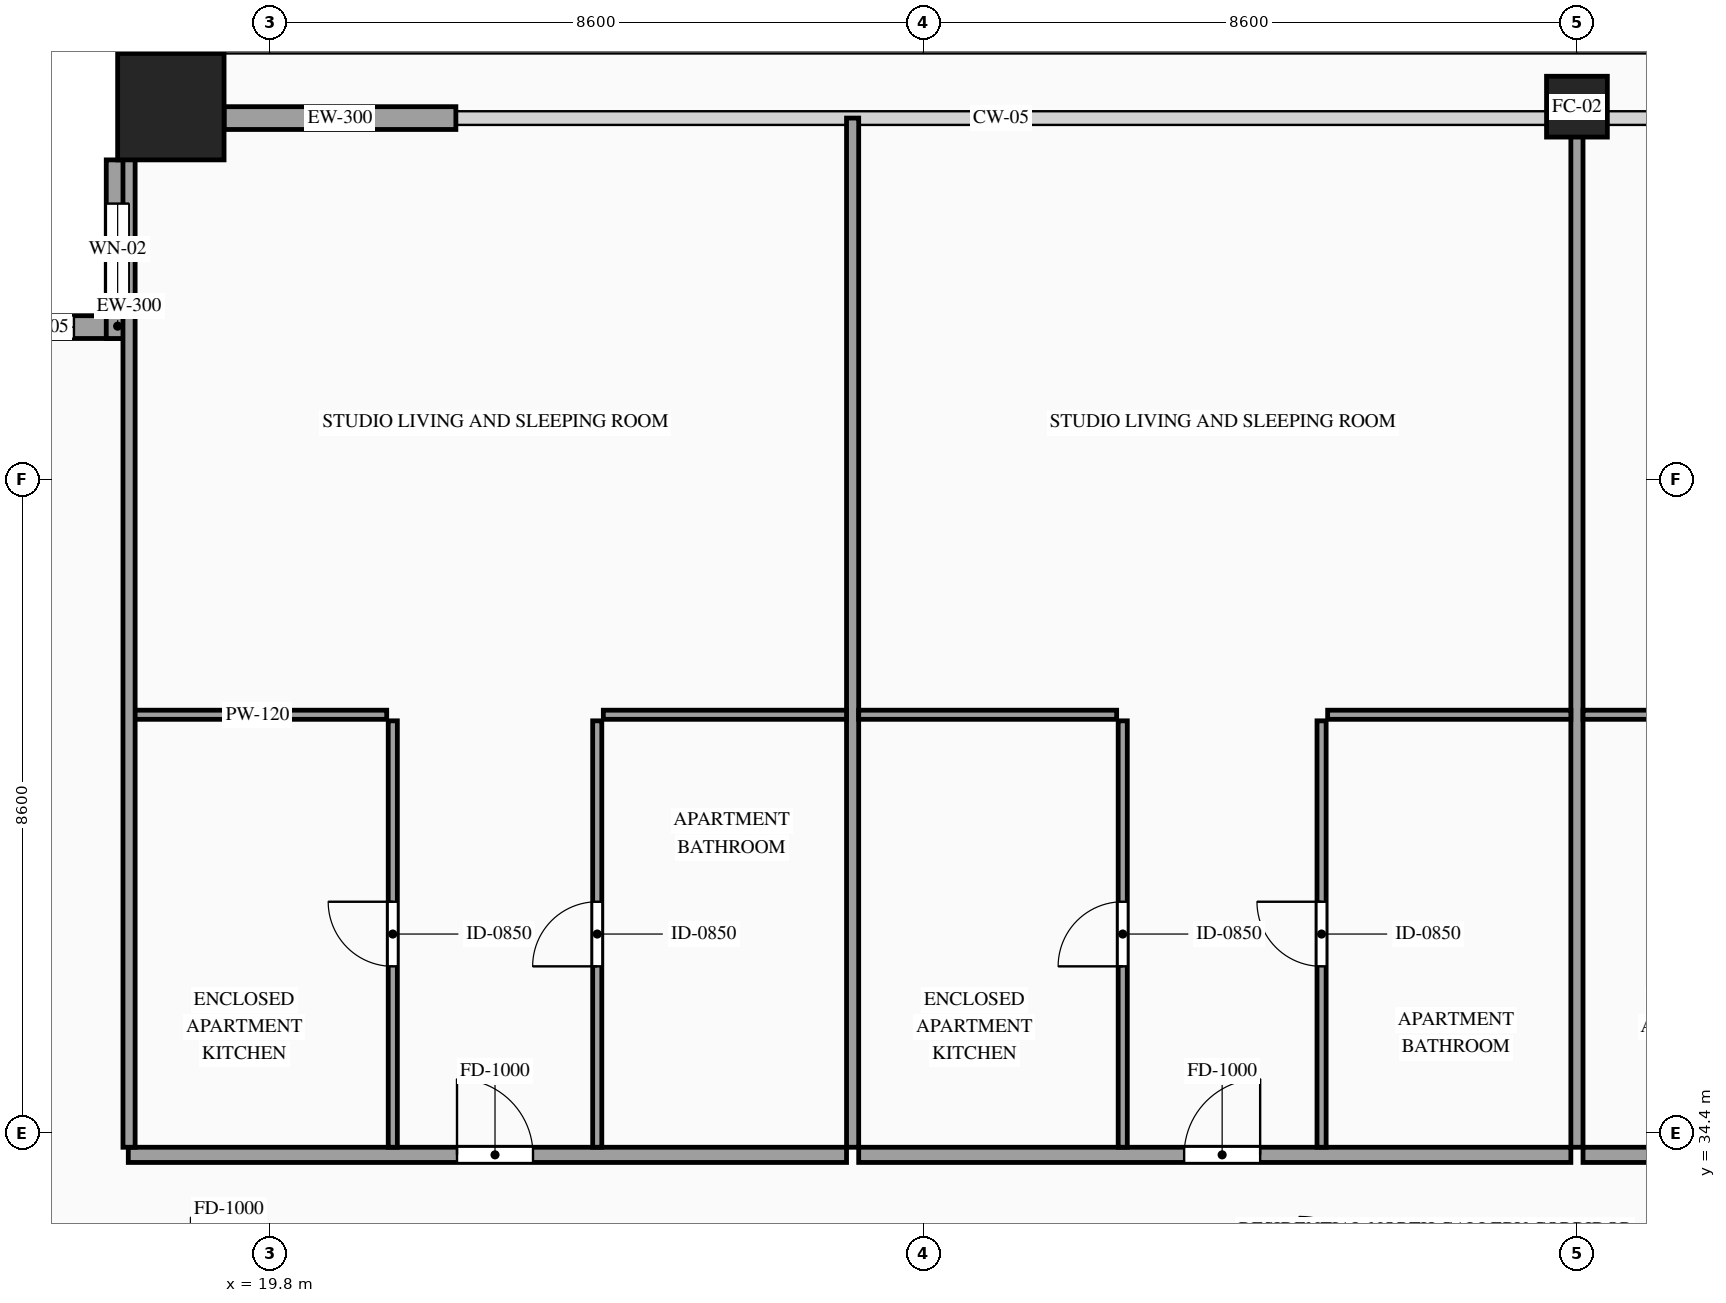
"""IFC4 building model, lengths in metres.
Left out: names, types, materials, properties, quantities, classifications, styles, units other than length and angle.
Written with IfcOpenShell. Run it as: python <this file> out.ifc"""

import sys

from ifc_helpers import new_model, si_unit, direction, frame, frame_2d, origin, origin_2d, place, context, subcontext, project, spatial, rectangle, hollow_rectangle, extrude, source, transform, mapped, element, fill, save


model = new_model("IFC4")
c1 = context("Model", 3, precision=1e-05, world=origin(), true_north=direction((0.0, 1.0)))
c2 = subcontext(c1, "Body", "Model", "MODEL_VIEW")
j1 = project(units=[si_unit("LENGTHUNIT", "METRE"), si_unit("PLANEANGLEUNIT", "RADIAN")], contexts=[c1])
p1 = place(None, origin())
s1 = spatial("IfcSite", under=j1, at=p1, CompositionType="ELEMENT")
p2 = place(p1, origin())
s2 = spatial("IfcBuilding", under=s1, at=p2, CompositionType="ELEMENT")
p3 = place(p2, frame((0.0, 0.0, 184.5)))
s3 = spatial("IfcBuildingStorey", under=s2, at=p3, CompositionType="ELEMENT", Elevation=184.5)
m1 = source(origin(), c2, "Body", "SweptSolid", [
    extrude(hollow_rectangle(XDim=1.4, YDim=1.4, WallThickness=0.06, at=origin_2d()), origin(), (0.0, 0.0, 1.0), 3.5),
])
p4 = place(p3, frame((18.5, 47.9, 0.0), z_axis=(0.0, 0.0, 1.0), x_axis=(1.0, 0.0, 0.0)))
e1 = element("IfcColumn", 1, at=p4, inside=s3, PredefinedType="COLUMN", context=c2, shape_type="MappedRepresentation", body=[
    mapped(m1, transform((0.0, 0.0, 0.0), scale=1.0)),
])
m2 = source(origin(), c2, "Body", "SweptSolid", [
    extrude(hollow_rectangle(XDim=0.8, YDim=0.8, WallThickness=0.036, at=origin_2d()), origin(), (0.0, 0.0, 1.0), 3.5),
])
p5 = place(p3, frame((37.0, 47.9, 0.0), z_axis=(0.0, 0.0, 1.0), x_axis=(1.0, 0.0, 0.0)))
e2 = element("IfcColumn", 2, at=p5, inside=s3, PredefinedType="COLUMN", context=c2, shape_type="MappedRepresentation", body=[
    mapped(m2, transform((0.0, 0.0, 0.0), scale=1.0)),
])
p6 = place(p3, frame((17.95, 45.0, 0.0), z_axis=(0.0, 0.0, 1.0), x_axis=(-1.0, 0.0, 0.0)))
e3 = element("IfcWall", 3, at=p6, inside=s3, PredefinedType="SOLIDWALL", context=c2, shape_type="SweptSolid", body=[
    extrude(rectangle(XDim=2.35, YDim=0.3, at=frame_2d((1.175, 0.0))), origin(), (0.0, 0.0, 1.0), 3.28),
])
p7 = place(p6, frame((0.725, 0.0, 0.85)))
e4 = element("IfcOpeningElement", 4, at=p7, cuts=e3, PredefinedType="OPENING", context=c2, shape_type="SweptSolid", body=[
    extrude(rectangle(XDim=0.9, YDim=1.5, at=frame_2d((0.45, 0.75))), frame((0.0, 0.165, 0.0), z_axis=(0.0, -1.0, 0.0), x_axis=(1.0, 0.0, 0.0)), (0.0, 0.0, 1.0), 0.33),
])
p8 = place(p3, frame((17.8, 47.2, 0.0), z_axis=(0.0, 0.0, 1.0), x_axis=(0.0, -1.0, 0.0)))
e5 = element("IfcWall", 5, at=p8, inside=s3, PredefinedType="SOLIDWALL", context=c2, shape_type="SweptSolid", body=[
    extrude(rectangle(XDim=2.35, YDim=0.3, at=frame_2d((1.175, 0.0))), origin(), (0.0, 0.0, 1.0), 3.28),
])
p9 = place(p8, frame((0.575, 0.0, 0.85)))
e6 = element("IfcOpeningElement", 6, at=p9, cuts=e5, PredefinedType="OPENING", context=c2, shape_type="SweptSolid", body=[
    extrude(rectangle(XDim=1.2, YDim=2.1, at=frame_2d((0.6, 1.05))), frame((0.0, 0.165, 0.0), z_axis=(0.0, -1.0, 0.0), x_axis=(1.0, 0.0, 0.0)), (0.0, 0.0, 1.0), 0.33),
])
m3 = source(origin(), c2, "Body", "SweptSolid", [
    extrude(rectangle(XDim=3.05, YDim=0.3, at=frame_2d((1.525, 0.0))), origin(), (0.0, 0.0, 1.0), 2.835),
])
p10 = place(p3, frame((19.2, 47.75, 0.0), z_axis=(0.0, 0.0, 1.0), x_axis=(1.0, 0.0, 0.0)))
e7 = element("IfcWall", 7, at=p10, inside=s3, PredefinedType="SOLIDWALL", context=c2, shape_type="MappedRepresentation", body=[
    mapped(m3, transform((0.0, 0.0, 0.0), scale=1.0)),
])
p11 = place(p3, frame((17.94, 34.11, 0.0), z_axis=(0.0, 0.0, 1.0), x_axis=(1.0, 0.0, 0.0)))
e8 = element("IfcWall", 8, at=p11, inside=s3, PredefinedType="PARTITIONING", context=c2, shape_type="SweptSolid", body=[
    extrude(rectangle(XDim=9.45, YDim=0.2, at=frame_2d((4.725, 0.0))), origin(), (0.0, 0.0, 1.0), 3.28),
])
p12 = place(p11, frame((4.325, 0.0, 0.0)))
e9 = element("IfcOpeningElement", 9, at=p12, cuts=e8, PredefinedType="OPENING", context=c2, shape_type="SweptSolid", body=[
    extrude(rectangle(XDim=1.0, YDim=2.2, at=frame_2d((0.5, 1.1))), frame((0.0, 0.115, 0.0), z_axis=(0.0, -1.0, 0.0), x_axis=(1.0, 0.0, 0.0)), (0.0, 0.0, 1.0), 0.23),
])
m4 = source(origin(), c2, "Body", "SweptSolid", [
    extrude(rectangle(XDim=13.54, YDim=0.16, at=frame_2d((6.77, 0.0))), origin(), (0.0, 0.0, 1.0), 3.28),
])
p13 = place(p3, frame((27.47, 34.21, 0.0), z_axis=(0.0, 0.0, 1.0), x_axis=(0.0, 1.0, 0.0)))
e10 = element("IfcWall", 10, at=p13, inside=s3, PredefinedType="PARTITIONING", context=c2, shape_type="MappedRepresentation", body=[
    mapped(m4, transform((0.0, 0.0, 0.0), scale=1.0)),
])
m5 = source(origin(), c2, "Body", "SweptSolid", [
    extrude(rectangle(XDim=3.4, YDim=0.12, at=frame_2d((1.7, 0.0))), origin(), (0.0, 0.0, 1.0), 3.28),
])
p14 = place(p3, frame((17.94, 39.9, 0.0), z_axis=(0.0, 0.0, 1.0), x_axis=(1.0, 0.0, 0.0)))
e11 = element("IfcWall", 11, at=p14, inside=s3, PredefinedType="PARTITIONING", context=c2, shape_type="MappedRepresentation", body=[
    mapped(m5, transform((0.0, 0.0, 0.0), scale=1.0)),
])
p15 = place(p3, frame((21.42, 34.21, 0.0), z_axis=(0.0, 0.0, 1.0), x_axis=(0.0, 1.0, 0.0)))
e12 = element("IfcWall", 12, at=p15, inside=s3, PredefinedType="PARTITIONING", context=c2, shape_type="SweptSolid", body=[
    extrude(rectangle(XDim=5.61, YDim=0.12, at=frame_2d((2.805, 0.0))), origin(), (0.0, 0.0, 1.0), 3.28),
])
p16 = place(p15, frame((2.38, 0.0, 0.0)))
e13 = element("IfcOpeningElement", 13, at=p16, cuts=e12, PredefinedType="OPENING", context=c2, shape_type="SweptSolid", body=[
    extrude(rectangle(XDim=0.85, YDim=2.1, at=frame_2d((0.425, 1.05))), frame((0.0, 0.075, 0.0), z_axis=(0.0, -1.0, 0.0), x_axis=(1.0, 0.0, 0.0)), (0.0, 0.0, 1.0), 0.15),
])
m6 = source(origin(), c2, "Body", "SweptSolid", [
    extrude(rectangle(XDim=3.2, YDim=0.12, at=frame_2d((1.6, 0.0))), origin(), (0.0, 0.0, 1.0), 2.875),
])
p17 = place(p3, frame((24.19, 39.9, 0.0), z_axis=(0.0, 0.0, 1.0), x_axis=(1.0, 0.0, 0.0)))
e14 = element("IfcWall", 14, at=p17, inside=s3, PredefinedType="PARTITIONING", context=c2, shape_type="MappedRepresentation", body=[
    mapped(m6, transform((0.0, 0.0, 0.0), scale=1.0)),
])
p18 = place(p3, frame((24.11, 34.21, 0.0), z_axis=(0.0, 0.0, 1.0), x_axis=(0.0, 1.0, 0.0)))
e15 = element("IfcWall", 15, at=p18, inside=s3, PredefinedType="PARTITIONING", context=c2, shape_type="SweptSolid", body=[
    extrude(rectangle(XDim=5.61, YDim=0.12, at=frame_2d((2.805, 0.0))), origin(), (0.0, 0.0, 1.0), 3.28),
])
p19 = place(p18, frame((2.38, 0.0, 0.0)))
e16 = element("IfcOpeningElement", 16, at=p19, cuts=e15, PredefinedType="OPENING", context=c2, shape_type="SweptSolid", body=[
    extrude(rectangle(XDim=0.85, YDim=2.1, at=frame_2d((0.425, 1.05))), frame((0.0, 0.075, 0.0), z_axis=(0.0, -1.0, 0.0), x_axis=(1.0, 0.0, 0.0)), (0.0, 0.0, 1.0), 0.15),
])
p20 = place(p3, frame((27.55, 34.11, 0.0), z_axis=(0.0, 0.0, 1.0), x_axis=(1.0, 0.0, 0.0)))
e17 = element("IfcWall", 17, at=p20, inside=s3, PredefinedType="PARTITIONING", context=c2, shape_type="SweptSolid", body=[
    extrude(rectangle(XDim=9.37, YDim=0.2, at=frame_2d((4.685, 0.0))), origin(), (0.0, 0.0, 1.0), 3.28),
])
p21 = place(p20, frame((4.282, 0.0, 0.0)))
e18 = element("IfcOpeningElement", 18, at=p21, cuts=e17, PredefinedType="OPENING", context=c2, shape_type="SweptSolid", body=[
    extrude(rectangle(XDim=1.0, YDim=2.2, at=frame_2d((0.5, 1.1))), frame((0.0, 0.115, 0.0), z_axis=(0.0, -1.0, 0.0), x_axis=(1.0, 0.0, 0.0)), (0.0, 0.0, 1.0), 0.23),
])
m7 = source(origin(), c2, "Body", "SweptSolid", [
    extrude(rectangle(XDim=13.54, YDim=0.16, at=frame_2d((6.77, 0.0))), origin(), (0.0, 0.0, 1.0), 2.687),
])
p22 = place(p3, frame((37.0, 34.21, 0.0), z_axis=(0.0, 0.0, 1.0), x_axis=(0.0, 1.0, 0.0)))
e19 = element("IfcWall", 19, at=p22, inside=s3, PredefinedType="PARTITIONING", context=c2, shape_type="MappedRepresentation", body=[
    mapped(m7, transform((0.0, 0.0, 0.0), scale=1.0)),
])
m8 = source(origin(), c2, "Body", "SweptSolid", [
    extrude(rectangle(XDim=3.394, YDim=0.12, at=frame_2d((1.697, 0.0))), origin(), (0.0, 0.0, 1.0), 2.875),
])
p23 = place(p3, frame((27.55, 39.9, 0.0), z_axis=(0.0, 0.0, 1.0), x_axis=(1.0, 0.0, 0.0)))
e20 = element("IfcWall", 20, at=p23, inside=s3, PredefinedType="PARTITIONING", context=c2, shape_type="MappedRepresentation", body=[
    mapped(m8, transform((0.0, 0.0, 0.0), scale=1.0)),
])
p24 = place(p3, frame((31.024, 34.21, 0.0), z_axis=(0.0, 0.0, 1.0), x_axis=(0.0, 1.0, 0.0)))
e21 = element("IfcWall", 21, at=p24, inside=s3, PredefinedType="PARTITIONING", context=c2, shape_type="SweptSolid", body=[
    extrude(rectangle(XDim=5.61, YDim=0.12, at=frame_2d((2.805, 0.0))), origin(), (0.0, 0.0, 1.0), 3.28),
])
p25 = place(p24, frame((2.38, 0.0, 0.0)))
e22 = element("IfcOpeningElement", 22, at=p25, cuts=e21, PredefinedType="OPENING", context=c2, shape_type="SweptSolid", body=[
    extrude(rectangle(XDim=0.85, YDim=2.1, at=frame_2d((0.425, 1.05))), frame((0.0, 0.075, 0.0), z_axis=(0.0, -1.0, 0.0), x_axis=(1.0, 0.0, 0.0)), (0.0, 0.0, 1.0), 0.15),
])
p26 = place(p3, frame((33.72, 39.9, 0.0), z_axis=(0.0, 0.0, 1.0), x_axis=(1.0, 0.0, 0.0)))
e23 = element("IfcWall", 23, at=p26, inside=s3, PredefinedType="PARTITIONING", context=c2, shape_type="MappedRepresentation", body=[
    mapped(m6, transform((0.0, 0.0, 0.0), scale=1.0)),
])
p27 = place(p3, frame((33.64, 34.21, 0.0), z_axis=(0.0, 0.0, 1.0), x_axis=(0.0, 1.0, 0.0)))
e24 = element("IfcWall", 24, at=p27, inside=s3, PredefinedType="PARTITIONING", context=c2, shape_type="SweptSolid", body=[
    extrude(rectangle(XDim=5.61, YDim=0.12, at=frame_2d((2.805, 0.0))), origin(), (0.0, 0.0, 1.0), 3.28),
])
p28 = place(p27, frame((2.38, 0.0, 0.0)))
e25 = element("IfcOpeningElement", 25, at=p28, cuts=e24, PredefinedType="OPENING", context=c2, shape_type="SweptSolid", body=[
    extrude(rectangle(XDim=0.85, YDim=2.1, at=frame_2d((0.425, 1.05))), frame((0.0, 0.075, 0.0), z_axis=(0.0, -1.0, 0.0), x_axis=(1.0, 0.0, 0.0)), (0.0, 0.0, 1.0), 0.15),
])
p29 = place(p3, frame((37.08, 34.11, 0.0), z_axis=(0.0, 0.0, 1.0), x_axis=(1.0, 0.0, 0.0)))
e26 = element("IfcWall", 26, at=p29, inside=s3, PredefinedType="PARTITIONING", context=c2, shape_type="SweptSolid", body=[
    extrude(rectangle(XDim=9.37, YDim=0.2, at=frame_2d((4.685, 0.0))), origin(), (0.0, 0.0, 1.0), 3.28),
])
p30 = place(p29, frame((4.282, 0.0, 0.0)))
e27 = element("IfcOpeningElement", 27, at=p30, cuts=e26, PredefinedType="OPENING", context=c2, shape_type="SweptSolid", body=[
    extrude(rectangle(XDim=1.0, YDim=2.2, at=frame_2d((0.5, 1.1))), frame((0.0, 0.115, 0.0), z_axis=(0.0, -1.0, 0.0), x_axis=(1.0, 0.0, 0.0)), (0.0, 0.0, 1.0), 0.23),
])
p31 = place(p3, frame((37.08, 39.9, 0.0), z_axis=(0.0, 0.0, 1.0), x_axis=(1.0, 0.0, 0.0)))
e28 = element("IfcWall", 28, at=p31, inside=s3, PredefinedType="PARTITIONING", context=c2, shape_type="MappedRepresentation", body=[
    mapped(m8, transform((0.0, 0.0, 0.0), scale=1.0)),
])
m9 = source(origin(), c2, "Body", "SweptSolid", [
    extrude(rectangle(XDim=13.39, YDim=0.16, at=frame_2d((6.695, 0.0))), origin(), (0.0, 0.0, 1.0), 3.28),
])
p32 = place(p3, frame((17.95, 34.21, 0.0), z_axis=(0.0, 0.0, 1.0), x_axis=(0.0, 1.0, 0.0)))
e29 = element("IfcWall", 29, at=p32, inside=s3, PredefinedType="PARTITIONING", context=c2, shape_type="MappedRepresentation", body=[
    mapped(m9, transform((0.0, 0.0, 0.0), scale=1.0)),
])
m10 = source(origin(), c2, "Body", "SweptSolid", [
    extrude(rectangle(XDim=0.9, YDim=1.5, at=frame_2d((0.45, 0.75))), frame((0.0, 0.03, 0.0), z_axis=(0.0, -1.0, 0.0), x_axis=(1.0, 0.0, 0.0)), (0.0, 0.0, 1.0), 0.06),
])
p33 = place(p7, origin())
e30 = element("IfcWindow", 30, at=p33, inside=s3, PartitioningType="SINGLE_PANEL", PredefinedType="WINDOW", context=c2, shape_type="MappedRepresentation", body=[
    mapped(m10, transform((0.0, 0.0, 0.0), scale=1.0)),
])
fill(e4, e30)
m11 = source(origin(), c2, "Body", "SweptSolid", [
    extrude(rectangle(XDim=1.2, YDim=2.1, at=frame_2d((0.6, 1.05))), frame((0.0, 0.03, 0.0), z_axis=(0.0, -1.0, 0.0), x_axis=(1.0, 0.0, 0.0)), (0.0, 0.0, 1.0), 0.06),
])
p34 = place(p9, origin())
e31 = element("IfcWindow", 31, at=p34, inside=s3, PartitioningType="SINGLE_PANEL", PredefinedType="WINDOW", context=c2, shape_type="MappedRepresentation", body=[
    mapped(m11, transform((0.0, 0.0, 0.0), scale=1.0)),
])
fill(e6, e31)
m12 = source(origin(), c2, "Body", "SweptSolid", [
    extrude(rectangle(XDim=1.0, YDim=2.2, at=frame_2d((0.5, 1.1))), frame((0.0, 0.025, 0.0), z_axis=(0.0, -1.0, 0.0), x_axis=(1.0, 0.0, 0.0)), (0.0, 0.0, 1.0), 0.05),
])
p35 = place(p12, origin())
e32 = element("IfcDoor", 32, at=p35, inside=s3, OperationType="SINGLE_SWING_LEFT", PredefinedType="DOOR", context=c2, shape_type="MappedRepresentation", body=[
    mapped(m12, transform((0.0, 0.0, 0.0), scale=1.0)),
])
fill(e9, e32)
m13 = source(origin(), c2, "Body", "SweptSolid", [
    extrude(rectangle(XDim=0.85, YDim=2.1, at=frame_2d((0.425, 1.05))), frame((0.0, 0.025, 0.0), z_axis=(0.0, -1.0, 0.0), x_axis=(1.0, 0.0, 0.0)), (0.0, 0.0, 1.0), 0.05),
])
p36 = place(p16, origin())
e33 = element("IfcDoor", 33, at=p36, inside=s3, OperationType="SINGLE_SWING_RIGHT", PredefinedType="DOOR", context=c2, shape_type="MappedRepresentation", body=[
    mapped(m13, transform((0.0, 0.0, 0.0), scale=1.0)),
])
fill(e13, e33)
p37 = place(p19, origin())
e34 = element("IfcDoor", 34, at=p37, inside=s3, OperationType="SINGLE_SWING_LEFT", PredefinedType="DOOR", context=c2, shape_type="MappedRepresentation", body=[
    mapped(m13, transform((0.0, 0.0, 0.0), scale=1.0)),
])
fill(e16, e34)
p38 = place(p21, origin())
e35 = element("IfcDoor", 35, at=p38, inside=s3, OperationType="SINGLE_SWING_RIGHT", PredefinedType="DOOR", context=c2, shape_type="MappedRepresentation", body=[
    mapped(m12, transform((0.0, 0.0, 0.0), scale=1.0)),
])
fill(e18, e35)
p39 = place(p25, origin())
e36 = element("IfcDoor", 36, at=p39, inside=s3, OperationType="SINGLE_SWING_LEFT", PredefinedType="DOOR", context=c2, shape_type="MappedRepresentation", body=[
    mapped(m13, transform((0.0, 0.0, 0.0), scale=1.0)),
])
fill(e22, e36)
p40 = place(p28, origin())
e37 = element("IfcDoor", 37, at=p40, inside=s3, OperationType="SINGLE_SWING_RIGHT", PredefinedType="DOOR", context=c2, shape_type="MappedRepresentation", body=[
    mapped(m13, transform((0.0, 0.0, 0.0), scale=1.0)),
])
fill(e25, e37)
save(model, sys.argv[1])
